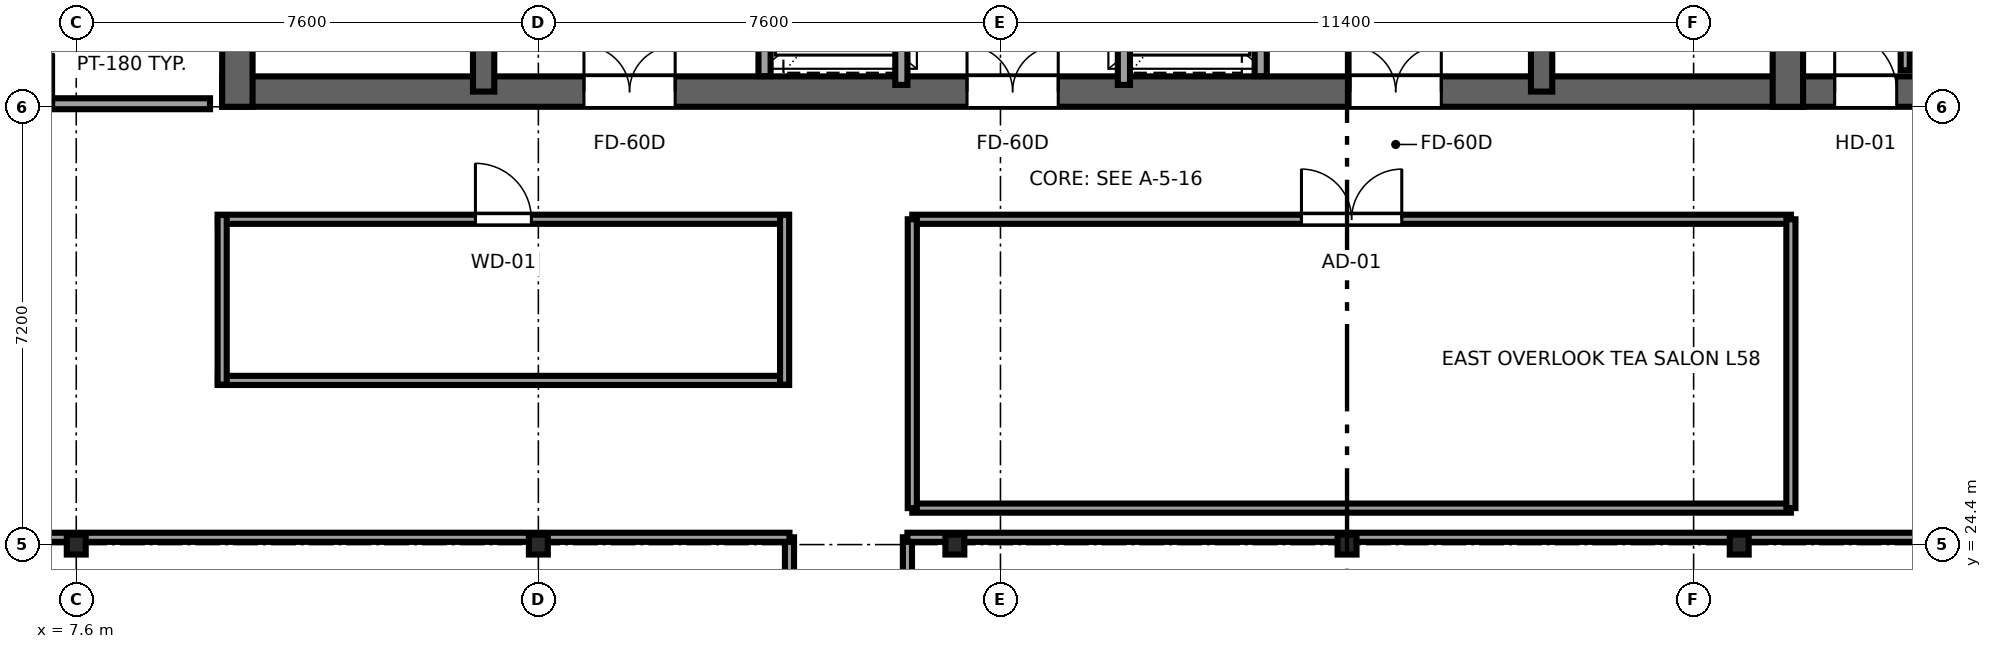
"""IFC4 building model, lengths in metres.
Left out: names, types, materials, properties, quantities, classifications, styles, units other than length and angle.
Written with IfcOpenShell. Run it as: python <this file> out.ifc"""

import sys

from ifc_helpers import new_model, si_unit, direction, frame, frame_2d, origin, origin_2d, place, context, subcontext, project, spatial, rectangle, i_section, extrude, source, transform, mapped, element, fill, save


model = new_model("IFC4")
c1 = context("Model", 3, precision=1e-05, world=origin(), true_north=direction((0.0, 1.0)))
c2 = subcontext(c1, "Body", "Model", "MODEL_VIEW")
j1 = project(units=[si_unit("LENGTHUNIT", "METRE"), si_unit("PLANEANGLEUNIT", "RADIAN")], contexts=[c1])
p1 = place(None, origin())
s1 = spatial("IfcSite", under=j1, at=p1, CompositionType="ELEMENT")
p2 = place(p1, origin())
s2 = spatial("IfcBuilding", under=s1, at=p2, CompositionType="ELEMENT")
p3 = place(p2, frame((0.0, 0.0, 220.35)))
s3 = spatial("IfcBuildingStorey", under=s2, at=p3, CompositionType="ELEMENT", Elevation=220.35)
p4 = place(p3, frame((10.0, 31.85, 0.0), z_axis=(0.0, 0.0, 1.0), x_axis=(1.0, 0.0, 0.0)))
e1 = element("IfcWall", 1, at=p4, inside=s3, PredefinedType="SHEAR", context=c2, shape_type="SweptSolid", body=[
    extrude(rectangle(XDim=26.0, YDim=0.5, at=frame_2d((13.0, 0.0))), origin(), (0.0, 0.0, 1.0), 3.55),
])
p5 = place(p4, frame((7.45, 0.0, 0.0), z_axis=(0.0, 0.0, 1.0), x_axis=(-1.0, 0.0, 0.0)))
e2 = element("IfcOpeningElement", 2, at=p5, cuts=e1, PredefinedType="OPENING", context=c2, shape_type="SweptSolid", body=[
    extrude(rectangle(XDim=1.5, YDim=2.04, at=frame_2d((0.75, 1.02))), frame((0.0, 0.26, 0.0), z_axis=(0.0, -1.0, 0.0), x_axis=(1.0, 0.0, 0.0)), (0.0, 0.0, 1.0), 0.52),
])
p6 = place(p4, frame((13.75, 0.0, 0.0), z_axis=(0.0, 0.0, 1.0), x_axis=(-1.0, 0.0, 0.0)))
e3 = element("IfcOpeningElement", 3, at=p6, cuts=e1, PredefinedType="OPENING", context=c2, shape_type="SweptSolid", body=[
    extrude(rectangle(XDim=1.5, YDim=2.04, at=frame_2d((0.75, 1.02))), frame((0.0, 0.26, 0.0), z_axis=(0.0, -1.0, 0.0), x_axis=(1.0, 0.0, 0.0)), (0.0, 0.0, 1.0), 0.52),
])
p7 = place(p4, frame((20.05, 0.0, 0.0), z_axis=(0.0, 0.0, 1.0), x_axis=(-1.0, 0.0, 0.0)))
e4 = element("IfcOpeningElement", 4, at=p7, cuts=e1, PredefinedType="OPENING", context=c2, shape_type="SweptSolid", body=[
    extrude(rectangle(XDim=1.5, YDim=2.04, at=frame_2d((0.75, 1.02))), frame((0.0, 0.26, 0.0), z_axis=(0.0, -1.0, 0.0), x_axis=(1.0, 0.0, 0.0)), (0.0, 0.0, 1.0), 0.52),
])
for number, where, z_axis, x_axis in (
    (5, (10.25, 31.6, 0.0), (0.0, 0.0, 1.0), (0.0, 1.0, 0.0)),
    (6, (35.75, 31.6, 0.0), (0.0, 0.0, 1.0), (0.0, 1.0, 0.0)),
):
    element("IfcWall", number, at=place(p3, frame(where, z_axis=z_axis, x_axis=x_axis)), inside=s3, PredefinedType="SHEAR", context=c2, shape_type="SweptSolid", body=[
        extrude(rectangle(XDim=13.6, YDim=0.5, at=frame_2d((6.8, 0.0))), origin(), (0.0, 0.0, 1.0), 3.55),
    ])
p8 = place(p3, frame((14.3, 31.85, 0.0), z_axis=(0.0, 0.0, 1.0), x_axis=(0.0, 1.0, 0.0)))
e7 = element("IfcWall", 7, at=p8, inside=s3, PredefinedType="SHEAR", context=c2, shape_type="SweptSolid", body=[
    extrude(rectangle(XDim=13.1, YDim=0.35, at=frame_2d((6.55, 0.0))), origin(), (0.0, 0.0, 1.0), 3.55),
])
p9 = place(p8, frame((0.7, 0.0, 0.0)))
e8 = element("IfcOpeningElement", 8, at=p9, cuts=e7, PredefinedType="OPENING", context=c2, shape_type="SweptSolid", body=[
    extrude(rectangle(XDim=1.1, YDim=2.12, at=frame_2d((0.55, 1.06))), frame((0.0, 0.185, 0.0), z_axis=(0.0, -1.0, 0.0), x_axis=(1.0, 0.0, 0.0)), (0.0, 0.0, 1.0), 0.37),
])
p10 = place(p3, frame((31.7, 31.85, 0.0), z_axis=(0.0, 0.0, 1.0), x_axis=(0.0, 1.0, 0.0)))
e9 = element("IfcWall", 9, at=p10, inside=s3, PredefinedType="SHEAR", context=c2, shape_type="SweptSolid", body=[
    extrude(rectangle(XDim=13.1, YDim=0.35, at=frame_2d((6.55, 0.0))), origin(), (0.0, 0.0, 1.0), 3.55),
])
p11 = place(p10, frame((1.8, 0.0, 0.0), z_axis=(0.0, 0.0, 1.0), x_axis=(-1.0, 0.0, 0.0)))
e10 = element("IfcOpeningElement", 10, at=p11, cuts=e9, PredefinedType="OPENING", context=c2, shape_type="SweptSolid", body=[
    extrude(rectangle(XDim=1.1, YDim=2.12, at=frame_2d((0.55, 1.06))), frame((0.0, 0.185, 0.0), z_axis=(0.0, -1.0, 0.0), x_axis=(1.0, 0.0, 0.0)), (0.0, 0.0, 1.0), 0.37),
])
p12 = place(p3, frame((36.0, 31.85, 0.0), z_axis=(0.0, 0.0, 1.0), x_axis=(1.0, 0.0, 0.0)))
e11 = element("IfcWall", 11, at=p12, inside=s3, PredefinedType="SHEAR", context=c2, shape_type="SweptSolid", body=[
    extrude(rectangle(XDim=3.8, YDim=0.5, at=frame_2d((1.9, 0.0))), origin(), (0.0, 0.0, 1.0), 3.55),
])
p13 = place(p12, frame((1.54, 0.0, 0.0), z_axis=(0.0, 0.0, 1.0), x_axis=(-1.0, 0.0, 0.0)))
e12 = element("IfcOpeningElement", 12, at=p13, cuts=e11, PredefinedType="OPENING", context=c2, shape_type="SweptSolid", body=[
    extrude(rectangle(XDim=1.02, YDim=2.03, at=frame_2d((0.51, 1.015))), frame((0.0, 0.26, 0.0), z_axis=(0.0, -1.0, 0.0), x_axis=(1.0, 0.0, 0.0)), (0.0, 0.0, 1.0), 0.52),
])
m1 = source(origin(), c2, "Body", "SweptSolid", [
    extrude(i_section(OverallWidth=0.311, OverallDepth=0.327, WebThickness=0.016, FlangeThickness=0.025, FilletRadius=0.017, at=origin_2d()), origin(), (0.0, 0.0, 1.0), 3.55),
])
for number, where, z_axis, x_axis in (
    (13, (7.6, 24.4, 0.0), (0.0, 0.0, 1.0), (1.0, 0.0, 0.0)),
    (14, (15.2, 24.4, 0.0), (0.0, 0.0, 1.0), (1.0, 0.0, 0.0)),
    (15, (22.05, 24.4, 0.0), (0.0, 0.0, 1.0), (1.0, 0.0, 0.0)),
    (16, (28.5, 24.4, 0.0), (0.0, 0.0, 1.0), (1.0, 0.0, 0.0)),
    (17, (34.95, 24.4, 0.0), (0.0, 0.0, 1.0), (1.0, 0.0, 0.0)),
):
    element("IfcColumn", number, at=place(p3, frame(where, z_axis=z_axis, x_axis=x_axis)), inside=s3, PredefinedType="COLUMN", context=c2, shape_type="MappedRepresentation", body=[
        mapped(m1, transform((0.0, 0.0, 0.0), x_axis=(1.0, 0.0, 0.0), y_axis=(0.0, 1.0, 0.0), z_axis=(0.0, 0.0, 1.0), scale=1.0)),
    ])
for number, where, z_axis, x_axis in (
    (18, (18.92, 32.104, 0.0), (0.0, 0.0, 1.0), (0.0, 1.0, 0.0)),
    (19, (27.08, 32.104, 0.0), (0.0, 0.0, 1.0), (0.0, 1.0, 0.0)),
):
    element("IfcWall", number, at=place(p3, frame(where, z_axis=z_axis, x_axis=x_axis)), inside=s3, PredefinedType="SOLIDWALL", context=c2, shape_type="SweptSolid", body=[
        extrude(rectangle(XDim=4.046, YDim=0.2, at=frame_2d((2.023, 0.0))), origin(), (0.0, 0.0, 1.0), 3.37),
    ])
p14 = place(p3, frame((21.17, 31.96, 0.0), z_axis=(0.0, 0.0, 1.0), x_axis=(0.0, 1.0, 0.0)))
e20 = element("IfcWall", 20, at=p14, inside=s3, PredefinedType="SOLIDWALL", context=c2, shape_type="SweptSolid", body=[
    extrude(rectangle(XDim=5.08, YDim=0.2, at=frame_2d((2.54, 0.0))), origin(), (0.0, 0.0, 1.0), 3.37),
])
p15 = place(p14, frame((0.74, 0.0, 0.0)))
e21 = element("IfcOpeningElement", 21, at=p15, cuts=e20, PredefinedType="OPENING", context=c2, shape_type="SweptSolid", body=[
    extrude(rectangle(XDim=1.1, YDim=2.12, at=frame_2d((0.55, 1.06))), frame((0.0, 0.11, 0.0), z_axis=(0.0, -1.0, 0.0), x_axis=(1.0, 0.0, 0.0)), (0.0, 0.0, 1.0), 0.22),
])
p16 = place(p14, frame((3.24, 0.0, 0.0)))
e22 = element("IfcOpeningElement", 22, at=p16, cuts=e20, PredefinedType="OPENING", context=c2, shape_type="SweptSolid", body=[
    extrude(rectangle(XDim=1.1, YDim=2.12, at=frame_2d((0.55, 1.06))), frame((0.0, 0.11, 0.0), z_axis=(0.0, -1.0, 0.0), x_axis=(1.0, 0.0, 0.0)), (0.0, 0.0, 1.0), 0.22),
])
p17 = place(p3, frame((24.83, 31.96, 0.0), z_axis=(0.0, 0.0, 1.0), x_axis=(0.0, 1.0, 0.0)))
e23 = element("IfcWall", 23, at=p17, inside=s3, PredefinedType="SOLIDWALL", context=c2, shape_type="SweptSolid", body=[
    extrude(rectangle(XDim=5.08, YDim=0.2, at=frame_2d((2.54, 0.0))), origin(), (0.0, 0.0, 1.0), 3.37),
])
p18 = place(p17, frame((0.74, 0.0, 0.0)))
e24 = element("IfcOpeningElement", 24, at=p18, cuts=e23, PredefinedType="OPENING", context=c2, shape_type="SweptSolid", body=[
    extrude(rectangle(XDim=1.1, YDim=2.12, at=frame_2d((0.55, 1.06))), frame((0.0, 0.11, 0.0), z_axis=(0.0, -1.0, 0.0), x_axis=(1.0, 0.0, 0.0)), (0.0, 0.0, 1.0), 0.22),
])
p19 = place(p17, frame((3.24, 0.0, 0.0)))
e25 = element("IfcOpeningElement", 25, at=p19, cuts=e23, PredefinedType="OPENING", context=c2, shape_type="SweptSolid", body=[
    extrude(rectangle(XDim=1.1, YDim=2.12, at=frame_2d((0.55, 1.06))), frame((0.0, 0.11, 0.0), z_axis=(0.0, -1.0, 0.0), x_axis=(1.0, 0.0, 0.0)), (0.0, 0.0, 1.0), 0.22),
])
p20 = place(p3, frame((37.68, 32.2, 0.0), z_axis=(0.0, 0.0, 1.0), x_axis=(0.0, 1.0, 0.0)))
e26 = element("IfcWall", 26, at=p20, inside=s3, PredefinedType="PARTITIONING", context=c2, shape_type="SweptSolid", body=[
    extrude(rectangle(XDim=4.0, YDim=0.15, at=frame_2d((2.0, 0.0))), origin(), (0.0, 0.0, 1.0), 3.37),
])
p21 = place(p20, frame((1.49, 0.0, 0.0)))
e27 = element("IfcOpeningElement", 27, at=p21, cuts=e26, PredefinedType="OPENING", context=c2, shape_type="SweptSolid", body=[
    extrude(rectangle(XDim=1.02, YDim=2.03, at=frame_2d((0.51, 1.015))), frame((0.0, 0.085, 0.0), z_axis=(0.0, -1.0, 0.0), x_axis=(1.0, 0.0, 0.0)), (0.0, 0.0, 1.0), 0.17),
])
p22 = place(p3, frame((19.33, 16.21, 0.0), z_axis=(0.0, 0.0, 1.0), x_axis=(0.0, 1.0, 0.0)))
e28 = element("IfcWall", 28, at=p22, inside=s3, PredefinedType="PARTITIONING", context=c2, shape_type="SweptSolid", body=[
    extrude(rectangle(XDim=8.31, YDim=0.15, at=frame_2d((4.155, 0.0))), origin(), (0.0, 0.0, 1.0), 3.37),
])
p23 = place(p22, frame((3.525, 0.0, 0.0)))
e29 = element("IfcOpeningElement", 29, at=p23, cuts=e28, PredefinedType="OPENING", context=c2, shape_type="SweptSolid", body=[
    extrude(rectangle(XDim=1.22, YDim=2.08, at=frame_2d((0.61, 1.04))), frame((0.0, 0.085, 0.0), z_axis=(0.0, -1.0, 0.0), x_axis=(1.0, 0.0, 0.0)), (0.0, 0.0, 1.0), 0.17),
])
p24 = place(p3, frame((3.005, 24.52, 0.0), z_axis=(0.0, 0.0, 1.0), x_axis=(1.0, 0.0, 0.0)))
e30 = element("IfcWall", 30, at=p24, inside=s3, PredefinedType="PARTITIONING", context=c2, shape_type="SweptSolid", body=[
    extrude(rectangle(XDim=16.325, YDim=0.15, at=frame_2d((8.163, 0.0))), origin(), (0.0, 0.0, 1.0), 2.758),
])
p25 = place(p3, frame((21.27, 16.71, 0.0), z_axis=(0.0, 0.0, 1.0), x_axis=(0.0, 1.0, 0.0)))
e31 = element("IfcWall", 31, at=p25, inside=s3, PredefinedType="PARTITIONING", context=c2, shape_type="SweptSolid", body=[
    extrude(rectangle(XDim=7.81, YDim=0.15, at=frame_2d((3.905, 0.0))), origin(), (0.0, 0.0, 1.0), 3.37),
])
p26 = place(p25, frame((3.275, 0.0, 0.0)))
e32 = element("IfcOpeningElement", 32, at=p26, cuts=e31, PredefinedType="OPENING", context=c2, shape_type="SweptSolid", body=[
    extrude(rectangle(XDim=1.22, YDim=2.08, at=frame_2d((0.61, 1.04))), frame((0.0, 0.085, 0.0), z_axis=(0.0, -1.0, 0.0), x_axis=(1.0, 0.0, 0.0)), (0.0, 0.0, 1.0), 0.17),
])
p27 = place(p3, frame((21.27, 24.52, 0.0), z_axis=(0.0, 0.0, 1.0), x_axis=(1.0, 0.0, 0.0)))
e33 = element("IfcWall", 33, at=p27, inside=s3, PredefinedType="PARTITIONING", context=c2, shape_type="SweptSolid", body=[
    extrude(rectangle(XDim=18.125, YDim=0.15, at=frame_2d((9.062, 0.0))), origin(), (0.0, 0.0, 1.0), 2.758),
])
p28 = place(p3, frame((3.005, 31.65, 0.0), z_axis=(0.0, 0.0, 1.0), x_axis=(1.0, 0.0, 0.0)))
e34 = element("IfcWall", 34, at=p28, inside=s3, PredefinedType="PARTITIONING", context=c2, shape_type="SweptSolid", body=[
    extrude(rectangle(XDim=6.795, YDim=0.18, at=frame_2d((3.397, 0.0))), origin(), (0.0, 0.0, 1.0), 3.37),
])
p29 = place(p28, frame((2.573, 0.0, 0.0)))
e35 = element("IfcOpeningElement", 35, at=p29, cuts=e34, PredefinedType="OPENING", context=c2, shape_type="SweptSolid", body=[
    extrude(rectangle(XDim=1.65, YDim=2.15, at=frame_2d((0.825, 1.075))), frame((0.0, 0.1, 0.0), z_axis=(0.0, -1.0, 0.0), x_axis=(1.0, 0.0, 0.0)), (0.0, 0.0, 1.0), 0.2),
])
p30 = place(p3, frame((9.93, 27.1, 0.0), z_axis=(0.0, 0.0, 1.0), x_axis=(1.0, 0.0, 0.0)))
e36 = element("IfcWall", 36, at=p30, inside=s3, PredefinedType="PARTITIONING", context=c2, shape_type="SweptSolid", body=[
    extrude(rectangle(XDim=9.39, YDim=0.15, at=frame_2d((4.695, 0.0))), origin(), (0.0, 0.0, 1.0), 3.37),
])
p31 = place(p3, frame((9.93, 29.75, 0.0), z_axis=(0.0, 0.0, 1.0), x_axis=(1.0, 0.0, 0.0)))
e37 = element("IfcWall", 37, at=p31, inside=s3, PredefinedType="PARTITIONING", context=c2, shape_type="SweptSolid", body=[
    extrude(rectangle(XDim=9.39, YDim=0.15, at=frame_2d((4.695, 0.0))), origin(), (0.0, 0.0, 1.0), 3.37),
])
p32 = place(p31, frame((4.235, 0.0, 0.0)))
e38 = element("IfcOpeningElement", 38, at=p32, cuts=e37, PredefinedType="OPENING", context=c2, shape_type="SweptSolid", body=[
    extrude(rectangle(XDim=0.92, YDim=2.01, at=frame_2d((0.46, 1.005))), frame((0.0, 0.085, 0.0), z_axis=(0.0, -1.0, 0.0), x_axis=(1.0, 0.0, 0.0)), (0.0, 0.0, 1.0), 0.17),
])
for number, where, z_axis, x_axis in (
    (39, (10.0, 27.03, 0.0), (0.0, 0.0, 1.0), (0.0, 1.0, 0.0)),
    (40, (19.25, 27.03, 0.0), (0.0, 0.0, 1.0), (0.0, 1.0, 0.0)),
):
    element("IfcWall", number, at=place(p3, frame(where, z_axis=z_axis, x_axis=x_axis)), inside=s3, PredefinedType="PARTITIONING", context=c2, shape_type="SweptSolid", body=[
        extrude(rectangle(XDim=2.79, YDim=0.15, at=frame_2d((1.395, 0.0))), origin(), (0.0, 0.0, 1.0), 3.37),
    ])
p33 = place(p3, frame((21.35, 25.0, 0.0), z_axis=(0.0, 0.0, 1.0), x_axis=(1.0, 0.0, 0.0)))
e41 = element("IfcWall", 41, at=p33, inside=s3, PredefinedType="PARTITIONING", context=c2, shape_type="SweptSolid", body=[
    extrude(rectangle(XDim=14.45, YDim=0.15, at=frame_2d((7.225, 0.0))), origin(), (0.0, 0.0, 1.0), 3.37),
])
p34 = place(p3, frame((21.35, 29.75, 0.0), z_axis=(0.0, 0.0, 1.0), x_axis=(1.0, 0.0, 0.0)))
e42 = element("IfcWall", 42, at=p34, inside=s3, PredefinedType="PARTITIONING", context=c2, shape_type="SweptSolid", body=[
    extrude(rectangle(XDim=14.45, YDim=0.15, at=frame_2d((7.225, 0.0))), origin(), (0.0, 0.0, 1.0), 3.37),
])
p35 = place(p34, frame((6.4, 0.0, 0.0)))
e43 = element("IfcOpeningElement", 43, at=p35, cuts=e42, PredefinedType="OPENING", context=c2, shape_type="SweptSolid", body=[
    extrude(rectangle(XDim=1.65, YDim=2.15, at=frame_2d((0.825, 1.075))), frame((0.0, 0.085, 0.0), z_axis=(0.0, -1.0, 0.0), x_axis=(1.0, 0.0, 0.0)), (0.0, 0.0, 1.0), 0.17),
])
for number, where, z_axis, x_axis in (
    (44, (21.35, 25.0, 0.0), (0.0, 0.0, 1.0), (0.0, 1.0, 0.0)),
    (45, (35.8, 25.0, 0.0), (0.0, 0.0, 1.0), (0.0, 1.0, 0.0)),
):
    element("IfcWall", number, at=place(p3, frame(where, z_axis=z_axis, x_axis=x_axis)), inside=s3, PredefinedType="PARTITIONING", context=c2, shape_type="SweptSolid", body=[
        extrude(rectangle(XDim=4.75, YDim=0.15, at=frame_2d((2.375, 0.0))), origin(), (0.0, 0.0, 1.0), 3.37),
    ])
m2 = source(origin(), c2, "Body", "SweptSolid", [
    extrude(rectangle(XDim=1.5, YDim=2.04, at=frame_2d((0.75, 1.02))), frame((0.0, 0.025, 0.0), z_axis=(0.0, -1.0, 0.0), x_axis=(1.0, 0.0, 0.0)), (0.0, 0.0, 1.0), 0.05),
])
p36 = place(p5, origin())
e46 = element("IfcDoor", 46, at=p36, inside=s3, OperationType="DOUBLE_DOOR_SINGLE_SWING", PredefinedType="DOOR", context=c2, shape_type="MappedRepresentation", body=[
    mapped(m2, transform((0.0, 0.0, 0.0), x_axis=(1.0, 0.0, 0.0), y_axis=(0.0, 1.0, 0.0), z_axis=(0.0, 0.0, 1.0), scale=1.0)),
])
fill(e2, e46)
p37 = place(p6, origin())
e47 = element("IfcDoor", 47, at=p37, inside=s3, OperationType="DOUBLE_DOOR_SINGLE_SWING", PredefinedType="DOOR", context=c2, shape_type="MappedRepresentation", body=[
    mapped(m2, transform((0.0, 0.0, 0.0), x_axis=(1.0, 0.0, 0.0), y_axis=(0.0, 1.0, 0.0), z_axis=(0.0, 0.0, 1.0), scale=1.0)),
])
fill(e3, e47)
p38 = place(p7, origin())
e48 = element("IfcDoor", 48, at=p38, inside=s3, OperationType="DOUBLE_DOOR_SINGLE_SWING", PredefinedType="DOOR", context=c2, shape_type="MappedRepresentation", body=[
    mapped(m2, transform((0.0, 0.0, 0.0), x_axis=(1.0, 0.0, 0.0), y_axis=(0.0, 1.0, 0.0), z_axis=(0.0, 0.0, 1.0), scale=1.0)),
])
fill(e4, e48)
m3 = source(origin(), c2, "Body", "SweptSolid", [
    extrude(rectangle(XDim=1.02, YDim=2.03, at=frame_2d((0.51, 1.015))), frame((0.0, 0.025, 0.0), z_axis=(0.0, -1.0, 0.0), x_axis=(1.0, 0.0, 0.0)), (0.0, 0.0, 1.0), 0.05),
])
p39 = place(p13, origin())
e49 = element("IfcDoor", 49, at=p39, inside=s3, OperationType="SINGLE_SWING_LEFT", PredefinedType="DOOR", context=c2, shape_type="MappedRepresentation", body=[
    mapped(m3, transform((0.0, 0.0, 0.0), x_axis=(1.0, 0.0, 0.0), y_axis=(0.0, 1.0, 0.0), z_axis=(0.0, 0.0, 1.0), scale=1.0)),
])
fill(e12, e49)
m4 = source(origin(), c2, "Body", "SweptSolid", [
    extrude(rectangle(XDim=1.65, YDim=2.15, at=frame_2d((0.825, 1.075))), frame((0.0, 0.025, 0.0), z_axis=(0.0, -1.0, 0.0), x_axis=(1.0, 0.0, 0.0)), (0.0, 0.0, 1.0), 0.05),
])
p40 = place(p29, origin())
e50 = element("IfcDoor", 50, at=p40, inside=s3, OperationType="DOUBLE_DOOR_SINGLE_SWING", PredefinedType="DOOR", context=c2, shape_type="MappedRepresentation", body=[
    mapped(m4, transform((0.0, 0.0, 0.0), x_axis=(1.0, 0.0, 0.0), y_axis=(0.0, 1.0, 0.0), z_axis=(0.0, 0.0, 1.0), scale=1.0)),
])
fill(e35, e50)
m5 = source(origin(), c2, "Body", "SweptSolid", [
    extrude(rectangle(XDim=0.92, YDim=2.01, at=frame_2d((0.46, 1.005))), frame((0.0, 0.025, 0.0), z_axis=(0.0, -1.0, 0.0), x_axis=(1.0, 0.0, 0.0)), (0.0, 0.0, 1.0), 0.05),
])
p41 = place(p32, origin())
e51 = element("IfcDoor", 51, at=p41, inside=s3, OperationType="SINGLE_SWING_LEFT", PredefinedType="DOOR", context=c2, shape_type="MappedRepresentation", body=[
    mapped(m5, transform((0.0, 0.0, 0.0), x_axis=(1.0, 0.0, 0.0), y_axis=(0.0, 1.0, 0.0), z_axis=(0.0, 0.0, 1.0), scale=1.0)),
])
fill(e38, e51)
p42 = place(p35, origin())
e52 = element("IfcDoor", 52, at=p42, inside=s3, OperationType="DOUBLE_DOOR_SINGLE_SWING", PredefinedType="DOOR", context=c2, shape_type="MappedRepresentation", body=[
    mapped(m4, transform((0.0, 0.0, 0.0), x_axis=(1.0, 0.0, 0.0), y_axis=(0.0, 1.0, 0.0), z_axis=(0.0, 0.0, 1.0), scale=1.0)),
])
fill(e43, e52)
save(model, sys.argv[1])
